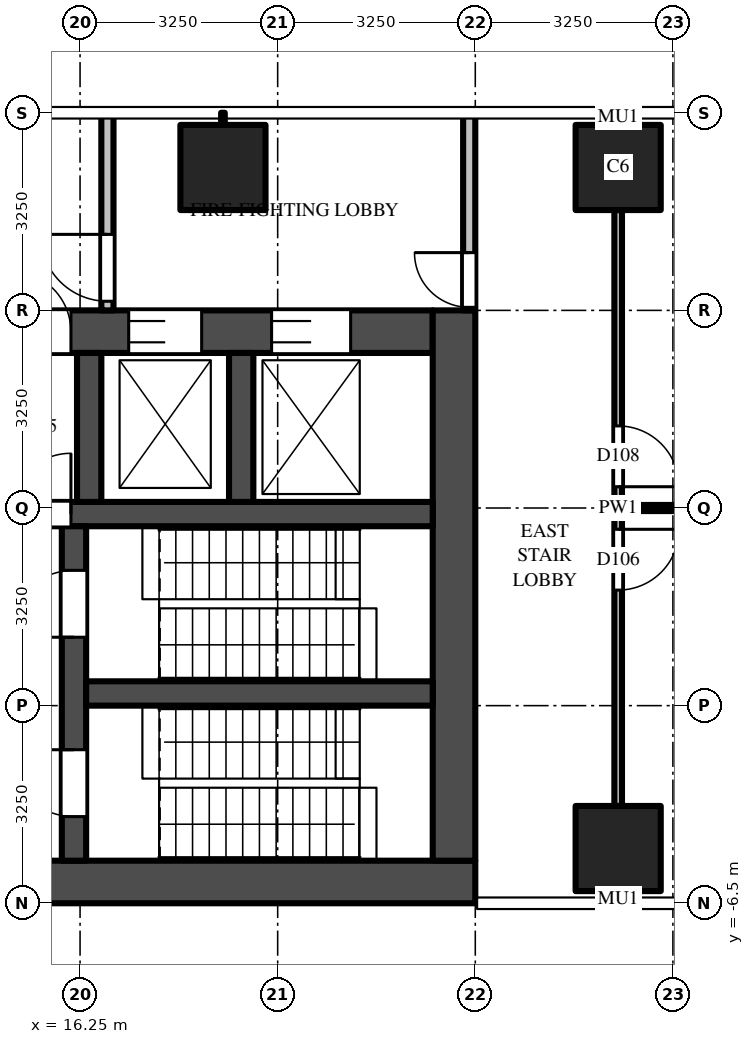
"""IFC4 building model, lengths in metres.
Left out: names, types, materials, properties, quantities, classifications, styles, units other than length and angle.
Written with IfcOpenShell. Run it as: python <this file> out.ifc"""

import sys

from ifc_helpers import new_model, si_unit, direction, frame, frame_2d, origin, origin_2d, place, context, subcontext, project, spatial, rectangle, extrude, source, transform, mapped, element, fill, save


model = new_model("IFC4")
c1 = context("Model", 3, precision=1e-05, world=origin(), true_north=direction((0.0, 1.0)))
c2 = subcontext(c1, "Body", "Model", "MODEL_VIEW")
j1 = project(units=[si_unit("LENGTHUNIT", "METRE"), si_unit("PLANEANGLEUNIT", "RADIAN")], contexts=[c1])
p1 = place(None, origin())
s1 = spatial("IfcSite", under=j1, at=p1, CompositionType="ELEMENT")
p2 = place(p1, origin())
s2 = spatial("IfcBuilding", under=s1, at=p2, CompositionType="ELEMENT")
p3 = place(p2, frame((0.0, 0.0, 70.0)))
s3 = spatial("IfcBuildingStorey", under=s2, at=p3, CompositionType="ELEMENT", Elevation=70.0)
m1 = source(origin(), c2, "Body", "SweptSolid", [
    extrude(rectangle(XDim=1.4, YDim=1.4, at=origin_2d()), origin(), (0.0, 0.0, 1.0), 4.5),
])
for number, where, z_axis, x_axis in (
    (1, (18.6, 5.6, 0.0), (0.0, 0.0, 1.0), (1.0, 0.0, 0.0)),
    (2, (25.1, 5.6, 0.0), (0.0, 0.0, 1.0), (1.0, 0.0, 0.0)),
    (3, (25.1, -5.6, 0.0), (0.0, 0.0, 1.0), (1.0, 0.0, 0.0)),
):
    element("IfcColumn", number, at=place(p3, frame(where, z_axis=z_axis, x_axis=x_axis)), inside=s3, PredefinedType="COLUMN", context=c2, shape_type="MappedRepresentation", body=[
        mapped(m1, transform((0.0, 0.0, 0.0))),
    ])
m2 = source(origin(), c2, "Body", "SweptSolid", [
    extrude(rectangle(XDim=16.45, YDim=0.7, at=frame_2d((8.225, 0.0))), origin(), (0.0, 0.0, 1.0), 4.25),
])
p4 = place(p3, frame((6.3, -6.15, 0.0), z_axis=(0.0, 0.0, 1.0), x_axis=(1.0, 0.0, 0.0)))
e4 = element("IfcWall", 4, at=p4, inside=s3, PredefinedType="SHEAR", context=c2, shape_type="MappedRepresentation", body=[
    mapped(m2, transform((0.0, 0.0, 0.0))),
])
m3 = source(origin(), c2, "Body", "SweptSolid", [
    extrude(rectangle(XDim=14.85, YDim=0.7, at=frame_2d((7.425, 0.0))), origin(), (0.0, 0.0, 1.0), 4.25),
])
p5 = place(p3, frame((7.2, 2.9, 0.0), z_axis=(0.0, 0.0, 1.0), x_axis=(1.0, 0.0, 0.0)))
e5 = element("IfcWall", 5, at=p5, inside=s3, PredefinedType="SHEAR", context=c2, shape_type="MappedRepresentation", body=[
    mapped(m3, transform((0.0, 0.0, 0.0))),
])
m4 = source(origin(), c2, "Body", "SweptSolid", [
    extrude(rectangle(XDim=1.3, YDim=2.1, at=frame_2d((0.65, 1.05))), frame((0.0, 0.36, 0.0), z_axis=(0.0, -1.0, 0.0), x_axis=(1.0, 0.0, 0.0)), (0.0, 0.0, 1.0), 0.72),
])
p6 = place(p5, frame((12.2, 0.0, 0.0)))
e6 = element("IfcOpeningElement", 6, at=p6, cuts=e5, PredefinedType="OPENING", context=c2, shape_type="MappedRepresentation", body=[
    mapped(m4, transform((0.0, 0.0, 0.0))),
])
m5 = source(origin(), c2, "Body", "SweptSolid", [
    extrude(rectangle(XDim=1.2, YDim=2.1, at=frame_2d((0.6, 1.05))), frame((0.0, 0.36, 0.0), z_axis=(0.0, -1.0, 0.0), x_axis=(1.0, 0.0, 0.0)), (0.0, 0.0, 1.0), 0.72),
])
p7 = place(p5, frame((9.85, 0.0, 0.0)))
e7 = element("IfcOpeningElement", 7, at=p7, cuts=e5, PredefinedType="OPENING", context=c2, shape_type="MappedRepresentation", body=[
    mapped(m5, transform((0.0, 0.0, 0.0))),
])
m6 = source(origin(), c2, "Body", "SweptSolid", [
    extrude(rectangle(XDim=1.0, YDim=2.1, at=frame_2d((0.5, 1.05))), frame((0.0, 0.36, 0.0), z_axis=(0.0, -1.0, 0.0), x_axis=(1.0, 0.0, 0.0)), (0.0, 0.0, 1.0), 0.72),
])
p8 = place(p5, frame((7.9, 0.0, 0.0)))
e8 = element("IfcOpeningElement", 8, at=p8, cuts=e5, PredefinedType="OPENING", context=c2, shape_type="MappedRepresentation", body=[
    mapped(m6, transform((0.0, 0.0, 0.0))),
])
m7 = source(origin(), c2, "Body", "SweptSolid", [
    extrude(rectangle(XDim=0.9, YDim=2.1, at=frame_2d((0.45, 1.05))), frame((0.0, 0.36, 0.0), z_axis=(0.0, -1.0, 0.0), x_axis=(1.0, 0.0, 0.0)), (0.0, 0.0, 1.0), 0.72),
])
p9 = place(p5, frame((0.65, 0.0, 0.0)))
e9 = element("IfcOpeningElement", 9, at=p9, cuts=e5, PredefinedType="OPENING", context=c2, shape_type="MappedRepresentation", body=[
    mapped(m7, transform((0.0, 0.0, 0.0))),
])
p10 = place(p5, frame((3.2, 0.0, 0.0)))
e10 = element("IfcOpeningElement", 10, at=p10, cuts=e5, PredefinedType="OPENING", context=c2, shape_type="MappedRepresentation", body=[
    mapped(m6, transform((0.0, 0.0, 0.0))),
])
p11 = place(p5, frame((5.85, 0.0, 0.0)))
e11 = element("IfcOpeningElement", 11, at=p11, cuts=e5, PredefinedType="OPENING", context=c2, shape_type="MappedRepresentation", body=[
    mapped(m7, transform((0.0, 0.0, 0.0))),
])
m8 = source(origin(), c2, "Body", "SweptSolid", [
    extrude(rectangle(XDim=9.05, YDim=0.7, at=frame_2d((4.525, 0.0))), origin(), (0.0, 0.0, 1.0), 4.25),
])
p12 = place(p3, frame((22.4, -5.8, 0.0), z_axis=(0.0, 0.0, 1.0), x_axis=(0.0, 1.0, 0.0)))
e12 = element("IfcWall", 12, at=p12, inside=s3, PredefinedType="SHEAR", context=c2, shape_type="MappedRepresentation", body=[
    mapped(m8, transform((0.0, 0.0, 0.0))),
])
m9 = source(origin(), c2, "Body", "SweptSolid", [
    extrude(rectangle(XDim=14.85, YDim=0.4, at=frame_2d((7.425, 0.0))), origin(), (0.0, 0.0, 1.0), 4.25),
])
p13 = place(p3, frame((7.2, -0.1, 0.0), z_axis=(0.0, 0.0, 1.0), x_axis=(1.0, 0.0, 0.0)))
e13 = element("IfcWall", 13, at=p13, inside=s3, PredefinedType="SHEAR", context=c2, shape_type="MappedRepresentation", body=[
    mapped(m9, transform((0.0, 0.0, 0.0))),
])
m10 = source(origin(), c2, "Body", "SweptSolid", [
    extrude(rectangle(XDim=1.0, YDim=2.1, at=frame_2d((0.5, 1.05))), frame((0.0, 0.21, 0.0), z_axis=(0.0, -1.0, 0.0), x_axis=(1.0, 0.0, 0.0)), (0.0, 0.0, 1.0), 0.42),
])
p14 = place(p13, frame((7.9, 0.0, 0.0)))
e14 = element("IfcOpeningElement", 14, at=p14, cuts=e13, PredefinedType="OPENING", context=c2, shape_type="MappedRepresentation", body=[
    mapped(m10, transform((0.0, 0.0, 0.0))),
])
m11 = source(origin(), c2, "Body", "SweptSolid", [
    extrude(rectangle(XDim=5.5, YDim=0.4, at=frame_2d((2.75, 0.0))), origin(), (0.0, 0.0, 1.0), 4.25),
])
p15 = place(p3, frame((16.15, -5.8, 0.0), z_axis=(0.0, 0.0, 1.0), x_axis=(0.0, 1.0, 0.0)))
e15 = element("IfcWall", 15, at=p15, inside=s3, PredefinedType="SHEAR", context=c2, shape_type="MappedRepresentation", body=[
    mapped(m11, transform((0.0, 0.0, 0.0))),
])
m12 = source(origin(), c2, "Body", "SweptSolid", [
    extrude(rectangle(XDim=1.1, YDim=2.1, at=frame_2d((0.55, 1.05))), frame((0.0, 0.21, 0.0), z_axis=(0.0, -1.0, 0.0), x_axis=(1.0, 0.0, 0.0)), (0.0, 0.0, 1.0), 0.42),
])
p16 = place(p15, frame((0.725, 0.0, 0.0)))
e16 = element("IfcOpeningElement", 16, at=p16, cuts=e15, PredefinedType="OPENING", context=c2, shape_type="MappedRepresentation", body=[
    mapped(m12, transform((0.0, 0.0, 0.0))),
])
p17 = place(p15, frame((3.675, 0.0, 0.0)))
e17 = element("IfcOpeningElement", 17, at=p17, cuts=e15, PredefinedType="OPENING", context=c2, shape_type="MappedRepresentation", body=[
    mapped(m12, transform((0.0, 0.0, 0.0))),
])
m13 = source(origin(), c2, "Body", "SweptSolid", [
    extrude(rectangle(XDim=5.7, YDim=0.4, at=frame_2d((2.85, 0.0))), origin(), (0.0, 0.0, 1.0), 4.25),
])
p18 = place(p3, frame((16.35, -3.05, 0.0), z_axis=(0.0, 0.0, 1.0), x_axis=(1.0, 0.0, 0.0)))
e18 = element("IfcWall", 18, at=p18, inside=s3, PredefinedType="SHEAR", context=c2, shape_type="MappedRepresentation", body=[
    mapped(m13, transform((0.0, 0.0, 0.0))),
])
m14 = source(origin(), c2, "Body", "SweptSolid", [
    extrude(rectangle(XDim=2.45, YDim=0.4, at=frame_2d((1.225, 0.0))), origin(), (0.0, 0.0, 1.0), 4.25),
])
for number, where, z_axis, x_axis in (
    (19, (16.4, 0.1, 0.0), (0.0, 0.0, 1.0), (0.0, 1.0, 0.0)),
    (20, (18.9, 0.1, 0.0), (0.0, 0.0, 1.0), (0.0, 1.0, 0.0)),
):
    element("IfcWall", number, at=place(p3, frame(where, z_axis=z_axis, x_axis=x_axis)), inside=s3, PredefinedType="SHEAR", context=c2, shape_type="MappedRepresentation", body=[
        mapped(m14, transform((0.0, 0.0, 0.0))),
    ])
m15 = source(origin(), c2, "Body", "SweptSolid", [
    extrude(rectangle(XDim=3.25, YDim=0.2, at=frame_2d((1.625, 0.0))), origin(), (0.0, 0.0, 1.0), 4.25),
])
p19 = place(p3, frame((16.7, 3.25, 0.0), z_axis=(0.0, 0.0, 1.0), x_axis=(0.0, 1.0, 0.0)))
e21 = element("IfcWall", 21, at=p19, inside=s3, PredefinedType="PARTITIONING", context=c2, shape_type="MappedRepresentation", body=[
    mapped(m15, transform((0.0, 0.0, 0.0))),
])
m16 = source(origin(), c2, "Body", "SweptSolid", [
    extrude(rectangle(XDim=1.1, YDim=2.1, at=frame_2d((0.55, 1.05))), frame((0.0, 0.11, 0.0), z_axis=(0.0, -1.0, 0.0), x_axis=(1.0, 0.0, 0.0)), (0.0, 0.0, 1.0), 0.22),
])
p20 = place(p19, frame((0.15, 0.0, 0.0)))
e22 = element("IfcOpeningElement", 22, at=p20, cuts=e21, PredefinedType="OPENING", context=c2, shape_type="MappedRepresentation", body=[
    mapped(m16, transform((0.0, 0.0, 0.0))),
])
p21 = place(p3, frame((22.65, 3.25, 0.0), z_axis=(0.0, 0.0, 1.0), x_axis=(0.0, 1.0, 0.0)))
e23 = element("IfcWall", 23, at=p21, inside=s3, PredefinedType="PARTITIONING", context=c2, shape_type="MappedRepresentation", body=[
    mapped(m15, transform((0.0, 0.0, 0.0))),
])
m17 = source(origin(), c2, "Body", "SweptSolid", [
    extrude(rectangle(XDim=0.9, YDim=2.1, at=frame_2d((0.45, 1.05))), frame((0.0, 0.11, 0.0), z_axis=(0.0, -1.0, 0.0), x_axis=(1.0, 0.0, 0.0)), (0.0, 0.0, 1.0), 0.22),
])
p22 = place(p21, frame((0.05, 0.0, 0.0)))
e24 = element("IfcOpeningElement", 24, at=p22, cuts=e23, PredefinedType="OPENING", context=c2, shape_type="MappedRepresentation", body=[
    mapped(m17, transform((0.0, 0.0, 0.0))),
])
m18 = source(origin(), c2, "Body", "SweptSolid", [
    extrude(rectangle(XDim=9.8, YDim=0.125, at=frame_2d((4.9, 0.0))), origin(), (0.0, 0.0, 1.0), 3.468),
])
p23 = place(p3, frame((25.1, 4.9, 0.0), z_axis=(0.0, 0.0, 1.0), x_axis=(0.0, -1.0, 0.0)))
e25 = element("IfcWall", 25, at=p23, inside=s3, PredefinedType="PARTITIONING", context=c2, shape_type="MappedRepresentation", body=[
    mapped(m18, transform((0.0, 0.0, 0.0))),
])
m19 = source(origin(), c2, "Body", "SweptSolid", [
    extrude(rectangle(XDim=1.0, YDim=2.1, at=frame_2d((0.5, 1.05))), frame((0.0, 0.073, 0.0), z_axis=(0.0, -1.0, 0.0), x_axis=(1.0, 0.0, 0.0)), (0.0, 0.0, 1.0), 0.145),
])
p24 = place(p23, frame((5.25, 0.0, 0.0)))
e26 = element("IfcOpeningElement", 26, at=p24, cuts=e25, PredefinedType="OPENING", context=c2, shape_type="MappedRepresentation", body=[
    mapped(m19, transform((0.0, 0.0, 0.0))),
])
p25 = place(p23, frame((3.55, 0.0, 0.0)))
e27 = element("IfcOpeningElement", 27, at=p25, cuts=e25, PredefinedType="OPENING", context=c2, shape_type="MappedRepresentation", body=[
    mapped(m19, transform((0.0, 0.0, 0.0))),
])
m20 = source(origin(), c2, "Body", "SweptSolid", [
    extrude(rectangle(XDim=7.137, YDim=0.1, at=frame_2d((3.569, 0.0))), origin(), (0.0, 0.0, 1.0), 3.33),
])
p26 = place(p3, frame((25.163, 0.0, 0.0), z_axis=(0.0, 0.0, 1.0), x_axis=(1.0, 0.0, 0.0)))
e28 = element("IfcWall", 28, at=p26, inside=s3, PredefinedType="PARTITIONING", context=c2, shape_type="MappedRepresentation", body=[
    mapped(m20, transform((0.0, 0.0, 0.0))),
])
m21 = source(origin(), c2, "Body", "SweptSolid", [
    extrude(rectangle(XDim=1.3, YDim=2.1, at=frame_2d((0.65, 1.05))), frame((0.0, -0.275, 0.0), z_axis=(0.0, -1.0, 0.0), x_axis=(1.0, 0.0, 0.0)), (0.0, 0.0, 1.0), 0.05),
])
p27 = place(p6, origin())
e29 = element("IfcDoor", 29, at=p27, inside=s3, OperationType="DOUBLE_DOOR_SLIDING", PredefinedType="DOOR", context=c2, shape_type="MappedRepresentation", body=[
    mapped(m21, transform((0.0, 0.0, 0.0))),
])
fill(e6, e29)
m22 = source(origin(), c2, "Body", "SweptSolid", [
    extrude(rectangle(XDim=1.2, YDim=2.1, at=frame_2d((0.6, 1.05))), frame((0.0, -0.275, 0.0), z_axis=(0.0, -1.0, 0.0), x_axis=(1.0, 0.0, 0.0)), (0.0, 0.0, 1.0), 0.05),
])
p28 = place(p7, origin())
e30 = element("IfcDoor", 30, at=p28, inside=s3, OperationType="DOUBLE_DOOR_SLIDING", PredefinedType="DOOR", context=c2, shape_type="MappedRepresentation", body=[
    mapped(m22, transform((0.0, 0.0, 0.0))),
])
fill(e7, e30)
m23 = source(origin(), c2, "Body", "SweptSolid", [
    extrude(rectangle(XDim=1.1, YDim=2.1, at=frame_2d((0.55, 1.05))), frame((0.0, 0.025, 0.0), z_axis=(0.0, -1.0, 0.0), x_axis=(1.0, 0.0, 0.0)), (0.0, 0.0, 1.0), 0.05),
])
p29 = place(p16, origin())
e31 = element("IfcDoor", 31, at=p29, inside=s3, OperationType="SINGLE_SWING_RIGHT", PredefinedType="DOOR", context=c2, shape_type="MappedRepresentation", body=[
    mapped(m23, transform((0.0, 0.0, 0.0))),
])
fill(e16, e31)
p30 = place(p17, origin())
e32 = element("IfcDoor", 32, at=p30, inside=s3, OperationType="SINGLE_SWING_LEFT", PredefinedType="DOOR", context=c2, shape_type="MappedRepresentation", body=[
    mapped(m23, transform((0.0, 0.0, 0.0))),
])
fill(e17, e32)
m24 = source(origin(), c2, "Body", "SweptSolid", [
    extrude(rectangle(XDim=1.0, YDim=2.1, at=frame_2d((0.5, 1.05))), frame((0.0, 0.025, 0.0), z_axis=(0.0, -1.0, 0.0), x_axis=(1.0, 0.0, 0.0)), (0.0, 0.0, 1.0), 0.05),
])
p31 = place(p14, origin())
e33 = element("IfcDoor", 33, at=p31, inside=s3, OperationType="SINGLE_SWING_RIGHT", PredefinedType="DOOR", context=c2, shape_type="MappedRepresentation", body=[
    mapped(m24, transform((0.0, 0.0, 0.0))),
])
fill(e14, e33)
m25 = source(origin(), c2, "Body", "SweptSolid", [
    extrude(rectangle(XDim=1.0, YDim=2.1, at=frame_2d((0.5, 1.05))), frame((0.0, -0.275, 0.0), z_axis=(0.0, -1.0, 0.0), x_axis=(1.0, 0.0, 0.0)), (0.0, 0.0, 1.0), 0.05),
])
p32 = place(p8, origin())
e34 = element("IfcDoor", 34, at=p32, inside=s3, OperationType="SINGLE_SWING_LEFT", PredefinedType="DOOR", context=c2, shape_type="MappedRepresentation", body=[
    mapped(m25, transform((0.0, 0.0, 0.0))),
])
fill(e8, e34)
p33 = place(p20, origin())
e35 = element("IfcDoor", 35, at=p33, inside=s3, OperationType="SINGLE_SWING_RIGHT", PredefinedType="DOOR", context=c2, shape_type="MappedRepresentation", body=[
    mapped(m23, transform((0.0, 0.0, 0.0))),
])
fill(e22, e35)
m26 = source(origin(), c2, "Body", "SweptSolid", [
    extrude(rectangle(XDim=0.9, YDim=2.1, at=frame_2d((0.45, 1.05))), frame((0.0, 0.025, 0.0), z_axis=(0.0, -1.0, 0.0), x_axis=(1.0, 0.0, 0.0)), (0.0, 0.0, 1.0), 0.05),
])
p34 = place(p22, origin())
e36 = element("IfcDoor", 36, at=p34, inside=s3, OperationType="SINGLE_SWING_RIGHT", PredefinedType="DOOR", context=c2, shape_type="MappedRepresentation", body=[
    mapped(m26, transform((0.0, 0.0, 0.0))),
])
fill(e24, e36)
p35 = place(p24, origin())
e37 = element("IfcDoor", 37, at=p35, inside=s3, OperationType="SINGLE_SWING_LEFT", PredefinedType="DOOR", context=c2, shape_type="MappedRepresentation", body=[
    mapped(m24, transform((0.0, 0.0, 0.0))),
])
fill(e26, e37)
p36 = place(p25, origin())
e38 = element("IfcDoor", 38, at=p36, inside=s3, OperationType="SINGLE_SWING_RIGHT", PredefinedType="DOOR", context=c2, shape_type="MappedRepresentation", body=[
    mapped(m24, transform((0.0, 0.0, 0.0))),
])
fill(e27, e38)
save(model, sys.argv[1])
